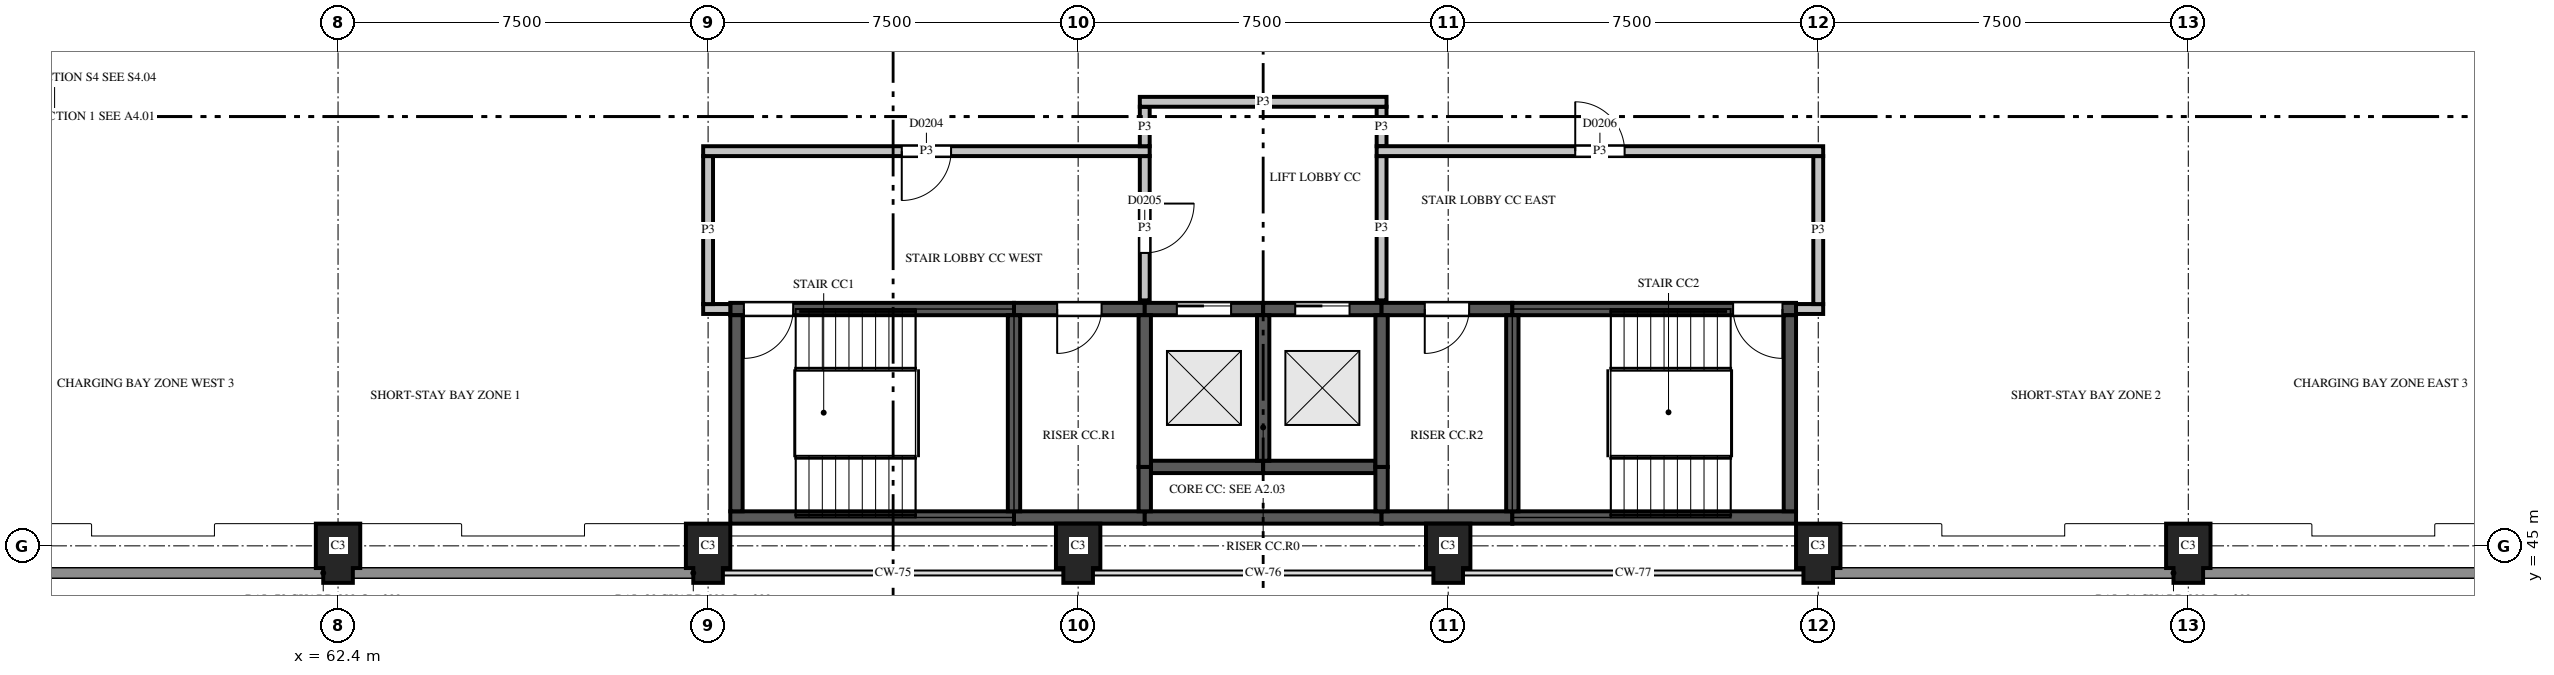
"""IFC4 building model, lengths in metres.
Left out: names, types, materials, properties, quantities, classifications, styles, units other than length and angle.
Written with IfcOpenShell. Run it as: python <this file> out.ifc"""

import sys

from ifc_helpers import new_model, si_unit, direction, frame, frame_2d, origin, place, context, subcontext, project, spatial, polyline, rectangle, outline, extrude, element, fill, save


model = new_model("IFC4")
c1 = context("Model", 3, precision=1e-05, world=origin(), true_north=direction((0.0, 1.0)))
c2 = subcontext(c1, "Body", "Model", "MODEL_VIEW")
j1 = project(units=[si_unit("LENGTHUNIT", "METRE"), si_unit("PLANEANGLEUNIT", "RADIAN")], contexts=[c1])
p1 = place(None, origin())
s1 = spatial("IfcSite", under=j1, at=p1, CompositionType="ELEMENT")
p2 = place(p1, origin())
s2 = spatial("IfcBuilding", under=s1, at=p2, CompositionType="ELEMENT")
p3 = place(p2, frame((0.0, 0.0, 8.2)))
s3 = spatial("IfcBuildingStorey", under=s2, at=p3, CompositionType="ELEMENT", Elevation=8.2)
for number, where, z_axis, x_axis in (
    (1, (62.4, 45.0, 0.0), (0.0, 0.0, 1.0), (0.0, -1.0, 0.0)),
    (2, (69.9, 45.0, 0.0), (0.0, 0.0, 1.0), (0.0, -1.0, 0.0)),
    (3, (77.4, 45.0, 0.0), (0.0, 0.0, 1.0), (0.0, -1.0, 0.0)),
    (4, (84.9, 45.0, 0.0), (0.0, 0.0, 1.0), (0.0, -1.0, 0.0)),
    (5, (92.4, 45.0, 0.0), (0.0, 0.0, 1.0), (0.0, -1.0, 0.0)),
    (6, (99.9, 45.0, 0.0), (0.0, 0.0, 1.0), (0.0, -1.0, 0.0)),
):
    element("IfcColumn", number, at=place(p3, frame(where, z_axis=z_axis, x_axis=x_axis)), inside=s3, PredefinedType="COLUMN", context=c2, shape_type="SweptSolid", body=[
        extrude(outline(polyline([(-0.45, -0.45), (0.45, -0.45), (0.45, -0.3), (0.75, -0.3), (0.75, 0.3), (0.45, 0.3), (0.45, 0.45), (-0.45, 0.45), (-0.45, -0.45)])), origin(), (0.0, 0.0, 1.0), 3.7),
    ])
p4 = place(p3, frame((70.35, 45.575, 0.0), z_axis=(0.0, 0.0, 1.0), x_axis=(1.0, 0.0, 0.0)))
e7 = element("IfcWall", 7, at=p4, inside=s3, PredefinedType="SHEAR", context=c2, shape_type="SweptSolid", body=[
    extrude(rectangle(XDim=5.75, YDim=0.25, at=frame_2d((2.875, 0.0))), origin(), (0.0, 0.0, 1.0), 3.7),
])
p5 = place(p3, frame((76.1, 45.575, 0.0), z_axis=(0.0, 0.0, 1.0), x_axis=(1.0, 0.0, 0.0)))
e8 = element("IfcWall", 8, at=p5, inside=s3, PredefinedType="SHEAR", context=c2, shape_type="SweptSolid", body=[
    extrude(rectangle(XDim=2.65, YDim=0.25, at=frame_2d((1.325, 0.0))), origin(), (0.0, 0.0, 1.0), 3.7),
])
p6 = place(p3, frame((78.75, 45.575, 0.0), z_axis=(0.0, 0.0, 1.0), x_axis=(1.0, 0.0, 0.0)))
e9 = element("IfcWall", 9, at=p6, inside=s3, PredefinedType="SHEAR", context=c2, shape_type="SweptSolid", body=[
    extrude(rectangle(XDim=4.8, YDim=0.25, at=frame_2d((2.4, 0.0))), origin(), (0.0, 0.0, 1.0), 3.7),
])
p7 = place(p3, frame((83.55, 45.575, 0.0), z_axis=(0.0, 0.0, 1.0), x_axis=(1.0, 0.0, 0.0)))
e10 = element("IfcWall", 10, at=p7, inside=s3, PredefinedType="SHEAR", context=c2, shape_type="SweptSolid", body=[
    extrude(rectangle(XDim=2.65, YDim=0.25, at=frame_2d((1.325, 0.0))), origin(), (0.0, 0.0, 1.0), 3.7),
])
p8 = place(p3, frame((86.2, 45.575, 0.0), z_axis=(0.0, 0.0, 1.0), x_axis=(1.0, 0.0, 0.0)))
e11 = element("IfcWall", 11, at=p8, inside=s3, PredefinedType="SHEAR", context=c2, shape_type="SweptSolid", body=[
    extrude(rectangle(XDim=5.75, YDim=0.25, at=frame_2d((2.875, 0.0))), origin(), (0.0, 0.0, 1.0), 3.7),
])
p9 = place(p3, frame((78.875, 46.6, 0.0), z_axis=(0.0, 0.0, 1.0), x_axis=(1.0, 0.0, 0.0)))
e12 = element("IfcWall", 12, at=p9, inside=s3, PredefinedType="SHEAR", context=c2, shape_type="SweptSolid", body=[
    extrude(rectangle(XDim=2.275, YDim=0.25, at=frame_2d((1.137, 0.0))), origin(), (0.0, 0.0, 1.0), 3.7),
])
p10 = place(p3, frame((81.15, 46.6, 0.0), z_axis=(0.0, 0.0, 1.0), x_axis=(1.0, 0.0, 0.0)))
e13 = element("IfcWall", 13, at=p10, inside=s3, PredefinedType="SHEAR", context=c2, shape_type="SweptSolid", body=[
    extrude(rectangle(XDim=2.275, YDim=0.25, at=frame_2d((1.138, 0.0))), origin(), (0.0, 0.0, 1.0), 3.7),
])
p11 = place(p3, frame((70.35, 49.8, 0.0), z_axis=(0.0, 0.0, 1.0), x_axis=(1.0, 0.0, 0.0)))
e14 = element("IfcWall", 14, at=p11, inside=s3, PredefinedType="SHEAR", context=c2, shape_type="SweptSolid", body=[
    extrude(rectangle(XDim=5.75, YDim=0.25, at=frame_2d((2.875, 0.0))), origin(), (0.0, 0.0, 1.0), 3.7),
])
p12 = place(p11, frame((0.275, 0.0, 0.0)))
e15 = element("IfcOpeningElement", 15, at=p12, cuts=e14, PredefinedType="OPENING", context=c2, shape_type="SweptSolid", body=[
    extrude(rectangle(XDim=1.0, YDim=2.1, at=frame_2d((0.5, 1.05))), frame((0.0, 0.135, 0.0), z_axis=(0.0, -1.0, 0.0), x_axis=(1.0, 0.0, 0.0)), (0.0, 0.0, 1.0), 0.27),
])
p13 = place(p3, frame((76.1, 49.8, 0.0), z_axis=(0.0, 0.0, 1.0), x_axis=(1.0, 0.0, 0.0)))
e16 = element("IfcWall", 16, at=p13, inside=s3, PredefinedType="SHEAR", context=c2, shape_type="SweptSolid", body=[
    extrude(rectangle(XDim=2.65, YDim=0.25, at=frame_2d((1.325, 0.0))), origin(), (0.0, 0.0, 1.0), 3.7),
])
p14 = place(p13, frame((0.875, 0.0, 0.0)))
e17 = element("IfcOpeningElement", 17, at=p14, cuts=e16, PredefinedType="OPENING", context=c2, shape_type="SweptSolid", body=[
    extrude(rectangle(XDim=0.9, YDim=2.1, at=frame_2d((0.45, 1.05))), frame((0.0, 0.135, 0.0), z_axis=(0.0, -1.0, 0.0), x_axis=(1.0, 0.0, 0.0)), (0.0, 0.0, 1.0), 0.27),
])
p15 = place(p3, frame((78.75, 49.8, 0.0), z_axis=(0.0, 0.0, 1.0), x_axis=(1.0, 0.0, 0.0)))
e18 = element("IfcWall", 18, at=p15, inside=s3, PredefinedType="SHEAR", context=c2, shape_type="SweptSolid", body=[
    extrude(rectangle(XDim=2.4, YDim=0.25, at=frame_2d((1.2, 0.0))), origin(), (0.0, 0.0, 1.0), 3.7),
])
p16 = place(p15, frame((0.65, 0.0, 0.0)))
e19 = element("IfcOpeningElement", 19, at=p16, cuts=e18, PredefinedType="OPENING", context=c2, shape_type="SweptSolid", body=[
    extrude(rectangle(XDim=1.1, YDim=2.1, at=frame_2d((0.55, 1.05))), frame((0.0, 0.135, 0.0), z_axis=(0.0, -1.0, 0.0), x_axis=(1.0, 0.0, 0.0)), (0.0, 0.0, 1.0), 0.27),
])
p17 = place(p3, frame((81.15, 49.8, 0.0), z_axis=(0.0, 0.0, 1.0), x_axis=(1.0, 0.0, 0.0)))
e20 = element("IfcWall", 20, at=p17, inside=s3, PredefinedType="SHEAR", context=c2, shape_type="SweptSolid", body=[
    extrude(rectangle(XDim=2.4, YDim=0.25, at=frame_2d((1.2, 0.0))), origin(), (0.0, 0.0, 1.0), 3.7),
])
p18 = place(p17, frame((0.65, 0.0, 0.0)))
e21 = element("IfcOpeningElement", 21, at=p18, cuts=e20, PredefinedType="OPENING", context=c2, shape_type="SweptSolid", body=[
    extrude(rectangle(XDim=1.1, YDim=2.1, at=frame_2d((0.55, 1.05))), frame((0.0, 0.135, 0.0), z_axis=(0.0, -1.0, 0.0), x_axis=(1.0, 0.0, 0.0)), (0.0, 0.0, 1.0), 0.27),
])
p19 = place(p3, frame((83.55, 49.8, 0.0), z_axis=(0.0, 0.0, 1.0), x_axis=(1.0, 0.0, 0.0)))
e22 = element("IfcWall", 22, at=p19, inside=s3, PredefinedType="SHEAR", context=c2, shape_type="SweptSolid", body=[
    extrude(rectangle(XDim=2.65, YDim=0.25, at=frame_2d((1.325, 0.0))), origin(), (0.0, 0.0, 1.0), 3.7),
])
p20 = place(p19, frame((0.875, 0.0, 0.0)))
e23 = element("IfcOpeningElement", 23, at=p20, cuts=e22, PredefinedType="OPENING", context=c2, shape_type="SweptSolid", body=[
    extrude(rectangle(XDim=0.9, YDim=2.1, at=frame_2d((0.45, 1.05))), frame((0.0, 0.135, 0.0), z_axis=(0.0, -1.0, 0.0), x_axis=(1.0, 0.0, 0.0)), (0.0, 0.0, 1.0), 0.27),
])
p21 = place(p3, frame((86.2, 49.8, 0.0), z_axis=(0.0, 0.0, 1.0), x_axis=(1.0, 0.0, 0.0)))
e24 = element("IfcWall", 24, at=p21, inside=s3, PredefinedType="SHEAR", context=c2, shape_type="SweptSolid", body=[
    extrude(rectangle(XDim=5.75, YDim=0.25, at=frame_2d((2.875, 0.0))), origin(), (0.0, 0.0, 1.0), 3.7),
])
p22 = place(p21, frame((4.475, 0.0, 0.0)))
e25 = element("IfcOpeningElement", 25, at=p22, cuts=e24, PredefinedType="OPENING", context=c2, shape_type="SweptSolid", body=[
    extrude(rectangle(XDim=1.0, YDim=2.1, at=frame_2d((0.5, 1.05))), frame((0.0, 0.135, 0.0), z_axis=(0.0, -1.0, 0.0), x_axis=(1.0, 0.0, 0.0)), (0.0, 0.0, 1.0), 0.27),
])
for number, where, z_axis, x_axis in (
    (26, (70.475, 45.7, 0.0), (0.0, 0.0, 1.0), (0.0, 1.0, 0.0)),
    (27, (76.1, 45.7, 0.0), (0.0, 0.0, 1.0), (0.0, 1.0, 0.0)),
):
    element("IfcWall", number, at=place(p3, frame(where, z_axis=z_axis, x_axis=x_axis)), inside=s3, PredefinedType="SHEAR", context=c2, shape_type="SweptSolid", body=[
        extrude(rectangle(XDim=3.975, YDim=0.25, at=frame_2d((1.988, 0.0))), origin(), (0.0, 0.0, 1.0), 3.7),
    ])
p23 = place(p3, frame((78.75, 45.7, 0.0), z_axis=(0.0, 0.0, 1.0), x_axis=(0.0, 1.0, 0.0)))
e28 = element("IfcWall", 28, at=p23, inside=s3, PredefinedType="SHEAR", context=c2, shape_type="SweptSolid", body=[
    extrude(rectangle(XDim=0.9, YDim=0.25, at=frame_2d((0.45, 0.0))), origin(), (0.0, 0.0, 1.0), 3.7),
])
p24 = place(p3, frame((78.75, 46.6, 0.0), z_axis=(0.0, 0.0, 1.0), x_axis=(0.0, 1.0, 0.0)))
e29 = element("IfcWall", 29, at=p24, inside=s3, PredefinedType="SHEAR", context=c2, shape_type="SweptSolid", body=[
    extrude(rectangle(XDim=3.075, YDim=0.25, at=frame_2d((1.538, 0.0))), origin(), (0.0, 0.0, 1.0), 3.7),
])
p25 = place(p3, frame((81.15, 46.725, 0.0), z_axis=(0.0, 0.0, 1.0), x_axis=(0.0, 1.0, 0.0)))
e30 = element("IfcWall", 30, at=p25, inside=s3, PredefinedType="SHEAR", context=c2, shape_type="SweptSolid", body=[
    extrude(rectangle(XDim=2.95, YDim=0.25, at=frame_2d((1.475, 0.0))), origin(), (0.0, 0.0, 1.0), 3.7),
])
p26 = place(p3, frame((83.55, 45.7, 0.0), z_axis=(0.0, 0.0, 1.0), x_axis=(0.0, 1.0, 0.0)))
e31 = element("IfcWall", 31, at=p26, inside=s3, PredefinedType="SHEAR", context=c2, shape_type="SweptSolid", body=[
    extrude(rectangle(XDim=0.9, YDim=0.25, at=frame_2d((0.45, 0.0))), origin(), (0.0, 0.0, 1.0), 3.7),
])
p27 = place(p3, frame((83.55, 46.6, 0.0), z_axis=(0.0, 0.0, 1.0), x_axis=(0.0, 1.0, 0.0)))
e32 = element("IfcWall", 32, at=p27, inside=s3, PredefinedType="SHEAR", context=c2, shape_type="SweptSolid", body=[
    extrude(rectangle(XDim=3.075, YDim=0.25, at=frame_2d((1.538, 0.0))), origin(), (0.0, 0.0, 1.0), 3.7),
])
for number, where, z_axis, x_axis in (
    (33, (86.2, 45.7, 0.0), (0.0, 0.0, 1.0), (0.0, 1.0, 0.0)),
    (34, (91.825, 45.7, 0.0), (0.0, 0.0, 1.0), (0.0, 1.0, 0.0)),
):
    element("IfcWall", number, at=place(p3, frame(where, z_axis=z_axis, x_axis=x_axis)), inside=s3, PredefinedType="SHEAR", context=c2, shape_type="SweptSolid", body=[
        extrude(rectangle(XDim=3.975, YDim=0.25, at=frame_2d((1.988, 0.0))), origin(), (0.0, 0.0, 1.0), 3.7),
    ])
for number, where, z_axis, x_axis in (
    (35, (69.8, 49.8, 0.0), (0.0, 0.0, 1.0), (1.0, 0.0, 0.0)),
    (36, (91.95, 49.8, 0.0), (0.0, 0.0, 1.0), (1.0, 0.0, 0.0)),
):
    element("IfcWall", number, at=place(p3, frame(where, z_axis=z_axis, x_axis=x_axis)), inside=s3, PredefinedType="PARTITIONING", context=c2, shape_type="SweptSolid", body=[
        extrude(rectangle(XDim=0.55, YDim=0.2, at=frame_2d((0.275, 0.0))), origin(), (0.0, 0.0, 1.0), 2.88),
    ])
p28 = place(p3, frame((92.4, 49.9, 0.0), z_axis=(0.0, 0.0, 1.0), x_axis=(0.0, 1.0, 0.0)))
e37 = element("IfcWall", 37, at=p28, inside=s3, PredefinedType="PARTITIONING", context=c2, shape_type="SweptSolid", body=[
    extrude(rectangle(XDim=3.0, YDim=0.2, at=frame_2d((1.5, 0.0))), origin(), (0.0, 0.0, 1.0), 2.88),
])
p29 = place(p3, frame((78.75, 49.975, 0.0), z_axis=(0.0, 0.0, 1.0), x_axis=(0.0, 1.0, 0.0)))
e38 = element("IfcWall", 38, at=p29, inside=s3, PredefinedType="PARTITIONING", context=c2, shape_type="SweptSolid", body=[
    extrude(rectangle(XDim=2.925, YDim=0.2, at=frame_2d((1.462, 0.0))), origin(), (0.0, 0.0, 1.0), 2.88),
])
p30 = place(p29, frame((0.962, 0.0, 0.0)))
e39 = element("IfcOpeningElement", 39, at=p30, cuts=e38, PredefinedType="OPENING", context=c2, shape_type="SweptSolid", body=[
    extrude(rectangle(XDim=1.0, YDim=2.1, at=frame_2d((0.5, 1.05))), frame((0.0, 0.11, 0.0), z_axis=(0.0, -1.0, 0.0), x_axis=(1.0, 0.0, 0.0)), (0.0, 0.0, 1.0), 0.22),
])
p31 = place(p3, frame((83.55, 49.975, 0.0), z_axis=(0.0, 0.0, 1.0), x_axis=(0.0, 1.0, 0.0)))
e40 = element("IfcWall", 40, at=p31, inside=s3, PredefinedType="PARTITIONING", context=c2, shape_type="SweptSolid", body=[
    extrude(rectangle(XDim=2.925, YDim=0.2, at=frame_2d((1.462, 0.0))), origin(), (0.0, 0.0, 1.0), 2.88),
])
p32 = place(p3, frame((69.9, 52.9, 0.0), z_axis=(0.0, 0.0, 1.0), x_axis=(0.0, -1.0, 0.0)))
e41 = element("IfcWall", 41, at=p32, inside=s3, PredefinedType="PARTITIONING", context=c2, shape_type="SweptSolid", body=[
    extrude(rectangle(XDim=3.0, YDim=0.2, at=frame_2d((1.5, 0.0))), origin(), (0.0, 0.0, 1.0), 2.88),
])
p33 = place(p3, frame((78.85, 53.0, 0.0), z_axis=(0.0, 0.0, 1.0), x_axis=(-1.0, 0.0, 0.0)))
e42 = element("IfcWall", 42, at=p33, inside=s3, PredefinedType="PARTITIONING", context=c2, shape_type="SweptSolid", body=[
    extrude(rectangle(XDim=9.05, YDim=0.2, at=frame_2d((4.525, 0.0))), origin(), (0.0, 0.0, 1.0), 2.88),
])
p34 = place(p33, frame((4.025, 0.0, 0.0)))
e43 = element("IfcOpeningElement", 43, at=p34, cuts=e42, PredefinedType="OPENING", context=c2, shape_type="SweptSolid", body=[
    extrude(rectangle(XDim=1.0, YDim=2.1, at=frame_2d((0.5, 1.05))), frame((0.0, 0.11, 0.0), z_axis=(0.0, -1.0, 0.0), x_axis=(1.0, 0.0, 0.0)), (0.0, 0.0, 1.0), 0.22),
])
p35 = place(p3, frame((83.55, 53.1, 0.0), z_axis=(0.0, 0.0, 1.0), x_axis=(0.0, 1.0, 0.0)))
e44 = element("IfcWall", 44, at=p35, inside=s3, PredefinedType="PARTITIONING", context=c2, shape_type="SweptSolid", body=[
    extrude(rectangle(XDim=0.8, YDim=0.2, at=frame_2d((0.4, 0.0))), origin(), (0.0, 0.0, 1.0), 2.88),
])
p36 = place(p3, frame((92.5, 53.0, 0.0), z_axis=(0.0, 0.0, 1.0), x_axis=(-1.0, 0.0, 0.0)))
e45 = element("IfcWall", 45, at=p36, inside=s3, PredefinedType="PARTITIONING", context=c2, shape_type="SweptSolid", body=[
    extrude(rectangle(XDim=9.05, YDim=0.2, at=frame_2d((4.525, 0.0))), origin(), (0.0, 0.0, 1.0), 2.88),
])
p37 = place(p36, frame((4.025, 0.0, 0.0)))
e46 = element("IfcOpeningElement", 46, at=p37, cuts=e45, PredefinedType="OPENING", context=c2, shape_type="SweptSolid", body=[
    extrude(rectangle(XDim=1.0, YDim=2.1, at=frame_2d((0.5, 1.05))), frame((0.0, 0.11, 0.0), z_axis=(0.0, -1.0, 0.0), x_axis=(1.0, 0.0, 0.0)), (0.0, 0.0, 1.0), 0.22),
])
p38 = place(p3, frame((78.75, 53.9, 0.0), z_axis=(0.0, 0.0, 1.0), x_axis=(0.0, -1.0, 0.0)))
e47 = element("IfcWall", 47, at=p38, inside=s3, PredefinedType="PARTITIONING", context=c2, shape_type="SweptSolid", body=[
    extrude(rectangle(XDim=0.8, YDim=0.2, at=frame_2d((0.4, 0.0))), origin(), (0.0, 0.0, 1.0), 2.88),
])
p39 = place(p3, frame((83.65, 54.0, 0.0), z_axis=(0.0, 0.0, 1.0), x_axis=(-1.0, 0.0, 0.0)))
e48 = element("IfcWall", 48, at=p39, inside=s3, PredefinedType="PARTITIONING", context=c2, shape_type="SweptSolid", body=[
    extrude(rectangle(XDim=5.0, YDim=0.2, at=frame_2d((2.5, 0.0))), origin(), (0.0, 0.0, 1.0), 2.88),
])
p40 = place(p34, origin())
e49 = element("IfcDoor", 49, at=p40, inside=s3, OperationType="SINGLE_SWING_LEFT", PredefinedType="DOOR", context=c2, shape_type="SweptSolid", body=[
    extrude(rectangle(XDim=1.0, YDim=2.1, at=frame_2d((0.5, 1.05))), frame((0.0, 0.025, 0.0), z_axis=(0.0, -1.0, 0.0), x_axis=(1.0, 0.0, 0.0)), (0.0, 0.0, 1.0), 0.05),
])
fill(e43, e49)
p41 = place(p30, origin())
e50 = element("IfcDoor", 50, at=p41, inside=s3, OperationType="SINGLE_SWING_RIGHT", PredefinedType="DOOR", context=c2, shape_type="SweptSolid", body=[
    extrude(rectangle(XDim=1.0, YDim=2.1, at=frame_2d((0.5, 1.05))), frame((0.0, 0.025, 0.0), z_axis=(0.0, -1.0, 0.0), x_axis=(1.0, 0.0, 0.0)), (0.0, 0.0, 1.0), 0.05),
])
fill(e39, e50)
p42 = place(p37, origin())
e51 = element("IfcDoor", 51, at=p42, inside=s3, OperationType="SINGLE_SWING_RIGHT", PredefinedType="DOOR", context=c2, shape_type="SweptSolid", body=[
    extrude(rectangle(XDim=1.0, YDim=2.1, at=frame_2d((0.5, 1.05))), frame((0.0, 0.025, 0.0), z_axis=(0.0, -1.0, 0.0), x_axis=(1.0, 0.0, 0.0)), (0.0, 0.0, 1.0), 0.05),
])
fill(e46, e51)
p43 = place(p16, origin())
e52 = element("IfcDoor", 52, at=p43, inside=s3, OperationType="SLIDING_TO_LEFT", PredefinedType="DOOR", context=c2, shape_type="SweptSolid", body=[
    extrude(rectangle(XDim=1.1, YDim=2.1, at=frame_2d((0.55, 1.05))), frame((0.0, 0.025, 0.0), z_axis=(0.0, -1.0, 0.0), x_axis=(1.0, 0.0, 0.0)), (0.0, 0.0, 1.0), 0.05),
])
fill(e19, e52)
p44 = place(p18, origin())
e53 = element("IfcDoor", 53, at=p44, inside=s3, OperationType="SLIDING_TO_LEFT", PredefinedType="DOOR", context=c2, shape_type="SweptSolid", body=[
    extrude(rectangle(XDim=1.1, YDim=2.1, at=frame_2d((0.55, 1.05))), frame((0.0, 0.025, 0.0), z_axis=(0.0, -1.0, 0.0), x_axis=(1.0, 0.0, 0.0)), (0.0, 0.0, 1.0), 0.05),
])
fill(e21, e53)
p45 = place(p12, origin())
e54 = element("IfcDoor", 54, at=p45, inside=s3, OperationType="SINGLE_SWING_LEFT", PredefinedType="DOOR", context=c2, shape_type="SweptSolid", body=[
    extrude(rectangle(XDim=1.0, YDim=2.1, at=frame_2d((0.5, 1.05))), frame((0.0, 0.025, 0.0), z_axis=(0.0, -1.0, 0.0), x_axis=(1.0, 0.0, 0.0)), (0.0, 0.0, 1.0), 0.05),
])
fill(e15, e54)
p46 = place(p22, origin())
e55 = element("IfcDoor", 55, at=p46, inside=s3, OperationType="SINGLE_SWING_RIGHT", PredefinedType="DOOR", context=c2, shape_type="SweptSolid", body=[
    extrude(rectangle(XDim=1.0, YDim=2.1, at=frame_2d((0.5, 1.05))), frame((0.0, 0.025, 0.0), z_axis=(0.0, -1.0, 0.0), x_axis=(1.0, 0.0, 0.0)), (0.0, 0.0, 1.0), 0.05),
])
fill(e25, e55)
p47 = place(p14, origin())
e56 = element("IfcDoor", 56, at=p47, inside=s3, OperationType="SINGLE_SWING_LEFT", PredefinedType="DOOR", context=c2, shape_type="SweptSolid", body=[
    extrude(rectangle(XDim=0.9, YDim=2.1, at=frame_2d((0.45, 1.05))), frame((0.0, 0.025, 0.0), z_axis=(0.0, -1.0, 0.0), x_axis=(1.0, 0.0, 0.0)), (0.0, 0.0, 1.0), 0.05),
])
fill(e17, e56)
p48 = place(p20, origin())
e57 = element("IfcDoor", 57, at=p48, inside=s3, OperationType="SINGLE_SWING_LEFT", PredefinedType="DOOR", context=c2, shape_type="SweptSolid", body=[
    extrude(rectangle(XDim=0.9, YDim=2.1, at=frame_2d((0.45, 1.05))), frame((0.0, 0.025, 0.0), z_axis=(0.0, -1.0, 0.0), x_axis=(1.0, 0.0, 0.0)), (0.0, 0.0, 1.0), 0.05),
])
fill(e23, e57)
save(model, sys.argv[1])
